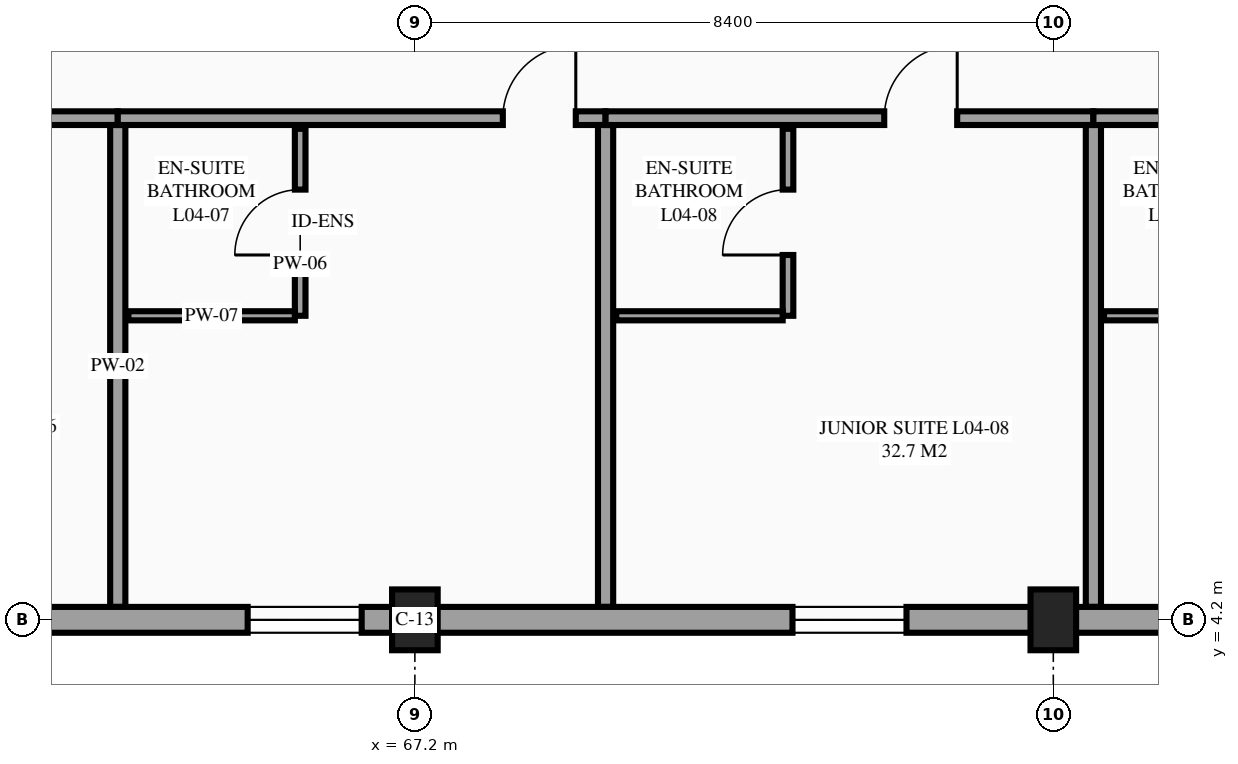
"""IFC4 building model, lengths in metres.
Left out: names, types, materials, properties, quantities, classifications, styles, units other than length and angle.
Written with IfcOpenShell. Run it as: python <this file> out.ifc"""

import sys

from ifc_helpers import new_model, si_unit, direction, frame, frame_2d, origin, origin_2d, place, context, subcontext, project, spatial, rectangle, extrude, element, fill, save


model = new_model("IFC4")
c1 = context("Model", 3, precision=1e-05, world=origin(), true_north=direction((0.0, 1.0)))
c2 = subcontext(c1, "Body", "Model", "MODEL_VIEW")
j1 = project(units=[si_unit("LENGTHUNIT", "METRE"), si_unit("PLANEANGLEUNIT", "RADIAN")], contexts=[c1])
p1 = place(None, origin())
s1 = spatial("IfcSite", under=j1, at=p1, CompositionType="ELEMENT")
p2 = place(p1, origin())
s2 = spatial("IfcBuilding", under=s1, at=p2, CompositionType="ELEMENT")
p3 = place(p2, frame((0.0, 0.0, 18.3)))
s3 = spatial("IfcBuildingStorey", under=s2, at=p3, CompositionType="ELEMENT", Elevation=18.3)
for number, where, z_axis, x_axis in (
    (1, (67.2, 4.2, 0.0), (0.0, 0.0, 1.0), (1.0, 0.0, 0.0)),
    (2, (75.6, 4.2, 0.0), (0.0, 0.0, 1.0), (1.0, 0.0, 0.0)),
):
    element("IfcColumn", number, at=place(p3, frame(where, z_axis=z_axis, x_axis=x_axis)), inside=s3, PredefinedType="COLUMN", context=c2, shape_type="SweptSolid", body=[
        extrude(rectangle(XDim=0.6, YDim=0.8, at=origin_2d()), origin(), (0.0, 0.0, 1.0), 3.6),
    ])
p4 = place(p3, frame((56.873, 10.8, 0.0), z_axis=(0.0, 0.0, 1.0), x_axis=(1.0, 0.0, 0.0)))
e3 = element("IfcWall", 3, at=p4, inside=s3, PredefinedType="PARTITIONING", context=c2, shape_type="SweptSolid", body=[
    extrude(rectangle(XDim=6.418, YDim=0.18, at=frame_2d((3.209, 0.0))), origin(), (0.0, 0.0, 1.0), 3.375),
])
p5 = place(p4, frame((4.366, 0.0, 0.0)))
e4 = element("IfcOpeningElement", 4, at=p5, cuts=e3, PredefinedType="OPENING", context=c2, shape_type="SweptSolid", body=[
    extrude(rectangle(XDim=0.96, YDim=2.15, at=frame_2d((0.48, 1.075))), frame((0.0, 0.1, 0.0), z_axis=(0.0, -1.0, 0.0), x_axis=(1.0, 0.0, 0.0)), (0.0, 0.0, 1.0), 0.2),
])
p6 = place(p3, frame((63.291, 4.37, 0.0), z_axis=(0.0, 0.0, 1.0), x_axis=(0.0, 1.0, 0.0)))
e5 = element("IfcWall", 5, at=p6, inside=s3, PredefinedType="PARTITIONING", context=c2, shape_type="SweptSolid", body=[
    extrude(rectangle(XDim=6.34, YDim=0.2, at=frame_2d((3.17, 0.0))), origin(), (0.0, 0.0, 1.0), 3.375),
])
p7 = place(p3, frame((63.291, 10.8, 0.0), z_axis=(0.0, 0.0, 1.0), x_axis=(1.0, 0.0, 0.0)))
e6 = element("IfcWall", 6, at=p7, inside=s3, PredefinedType="PARTITIONING", context=c2, shape_type="SweptSolid", body=[
    extrude(rectangle(XDim=6.418, YDim=0.18, at=frame_2d((3.209, 0.0))), origin(), (0.0, 0.0, 1.0), 3.375),
])
p8 = place(p7, frame((5.066, 0.0, 0.0)))
e7 = element("IfcOpeningElement", 7, at=p8, cuts=e6, PredefinedType="OPENING", context=c2, shape_type="SweptSolid", body=[
    extrude(rectangle(XDim=0.96, YDim=2.15, at=frame_2d((0.48, 1.075))), frame((0.0, 0.1, 0.0), z_axis=(0.0, -1.0, 0.0), x_axis=(1.0, 0.0, 0.0)), (0.0, 0.0, 1.0), 0.2),
])
p9 = place(p3, frame((69.709, 4.37, 0.0), z_axis=(0.0, 0.0, 1.0), x_axis=(0.0, 1.0, 0.0)))
e8 = element("IfcWall", 8, at=p9, inside=s3, PredefinedType="PARTITIONING", context=c2, shape_type="SweptSolid", body=[
    extrude(rectangle(XDim=6.34, YDim=0.2, at=frame_2d((3.17, 0.0))), origin(), (0.0, 0.0, 1.0), 3.375),
])
p10 = place(p3, frame((65.691, 8.2, 0.0), z_axis=(0.0, 0.0, 1.0), x_axis=(0.0, 1.0, 0.0)))
e9 = element("IfcWall", 9, at=p10, inside=s3, PredefinedType="PARTITIONING", context=c2, shape_type="SweptSolid", body=[
    extrude(rectangle(XDim=2.46, YDim=0.14, at=frame_2d((1.23, 0.0))), origin(), (0.0, 0.0, 1.0), 3.375),
])
p11 = place(p10, frame((0.8, 0.0, 0.0)))
e10 = element("IfcOpeningElement", 10, at=p11, cuts=e9, PredefinedType="OPENING", context=c2, shape_type="SweptSolid", body=[
    extrude(rectangle(XDim=0.86, YDim=2.1, at=frame_2d((0.43, 1.05))), frame((0.0, 0.08, 0.0), z_axis=(0.0, -1.0, 0.0), x_axis=(1.0, 0.0, 0.0)), (0.0, 0.0, 1.0), 0.16),
])
p12 = place(p3, frame((63.431, 8.2, 0.0), z_axis=(0.0, 0.0, 1.0), x_axis=(1.0, 0.0, 0.0)))
e11 = element("IfcWall", 11, at=p12, inside=s3, PredefinedType="PARTITIONING", context=c2, shape_type="SweptSolid", body=[
    extrude(rectangle(XDim=2.19, YDim=0.12, at=frame_2d((1.095, 0.0))), origin(), (0.0, 0.0, 1.0), 3.375),
])
p13 = place(p3, frame((69.709, 10.8, 0.0), z_axis=(0.0, 0.0, 1.0), x_axis=(1.0, 0.0, 0.0)))
e12 = element("IfcWall", 12, at=p13, inside=s3, PredefinedType="PARTITIONING", context=c2, shape_type="SweptSolid", body=[
    extrude(rectangle(XDim=6.418, YDim=0.18, at=frame_2d((3.209, 0.0))), origin(), (0.0, 0.0, 1.0), 3.375),
])
p14 = place(p13, frame((3.666, 0.0, 0.0)))
e13 = element("IfcOpeningElement", 13, at=p14, cuts=e12, PredefinedType="OPENING", context=c2, shape_type="SweptSolid", body=[
    extrude(rectangle(XDim=0.96, YDim=2.15, at=frame_2d((0.48, 1.075))), frame((0.0, 0.1, 0.0), z_axis=(0.0, -1.0, 0.0), x_axis=(1.0, 0.0, 0.0)), (0.0, 0.0, 1.0), 0.2),
])
p15 = place(p3, frame((76.127, 4.37, 0.0), z_axis=(0.0, 0.0, 1.0), x_axis=(0.0, 1.0, 0.0)))
e14 = element("IfcWall", 14, at=p15, inside=s3, PredefinedType="PARTITIONING", context=c2, shape_type="SweptSolid", body=[
    extrude(rectangle(XDim=6.34, YDim=0.2, at=frame_2d((3.17, 0.0))), origin(), (0.0, 0.0, 1.0), 3.375),
])
p16 = place(p3, frame((72.109, 8.2, 0.0), z_axis=(0.0, 0.0, 1.0), x_axis=(0.0, 1.0, 0.0)))
e15 = element("IfcWall", 15, at=p16, inside=s3, PredefinedType="PARTITIONING", context=c2, shape_type="SweptSolid", body=[
    extrude(rectangle(XDim=2.46, YDim=0.14, at=frame_2d((1.23, 0.0))), origin(), (0.0, 0.0, 1.0), 3.375),
])
p17 = place(p16, frame((0.8, 0.0, 0.0)))
e16 = element("IfcOpeningElement", 16, at=p17, cuts=e15, PredefinedType="OPENING", context=c2, shape_type="SweptSolid", body=[
    extrude(rectangle(XDim=0.86, YDim=2.1, at=frame_2d((0.43, 1.05))), frame((0.0, 0.08, 0.0), z_axis=(0.0, -1.0, 0.0), x_axis=(1.0, 0.0, 0.0)), (0.0, 0.0, 1.0), 0.16),
])
p18 = place(p3, frame((69.849, 8.2, 0.0), z_axis=(0.0, 0.0, 1.0), x_axis=(1.0, 0.0, 0.0)))
e17 = element("IfcWall", 17, at=p18, inside=s3, PredefinedType="PARTITIONING", context=c2, shape_type="SweptSolid", body=[
    extrude(rectangle(XDim=2.19, YDim=0.12, at=frame_2d((1.095, 0.0))), origin(), (0.0, 0.0, 1.0), 3.375),
])
p19 = place(p3, frame((76.127, 10.8, 0.0), z_axis=(0.0, 0.0, 1.0), x_axis=(1.0, 0.0, 0.0)))
e18 = element("IfcWall", 18, at=p19, inside=s3, PredefinedType="PARTITIONING", context=c2, shape_type="SweptSolid", body=[
    extrude(rectangle(XDim=6.418, YDim=0.18, at=frame_2d((3.209, 0.0))), origin(), (0.0, 0.0, 1.0), 3.375),
])
p20 = place(p19, frame((4.366, 0.0, 0.0)))
e19 = element("IfcOpeningElement", 19, at=p20, cuts=e18, PredefinedType="OPENING", context=c2, shape_type="SweptSolid", body=[
    extrude(rectangle(XDim=0.96, YDim=2.15, at=frame_2d((0.48, 1.075))), frame((0.0, 0.1, 0.0), z_axis=(0.0, -1.0, 0.0), x_axis=(1.0, 0.0, 0.0)), (0.0, 0.0, 1.0), 0.2),
])
p21 = place(p3, frame((76.267, 8.2, 0.0), z_axis=(0.0, 0.0, 1.0), x_axis=(1.0, 0.0, 0.0)))
e20 = element("IfcWall", 20, at=p21, inside=s3, PredefinedType="PARTITIONING", context=c2, shape_type="SweptSolid", body=[
    extrude(rectangle(XDim=2.19, YDim=0.12, at=frame_2d((1.095, 0.0))), origin(), (0.0, 0.0, 1.0), 3.375),
])
p22 = place(p3, frame((58.8, 4.2, 0.0), z_axis=(0.0, 0.0, 1.0), x_axis=(1.0, 0.0, 0.0)))
e21 = element("IfcWall", 21, at=p22, inside=s3, PredefinedType="STANDARD", context=c2, shape_type="SweptSolid", body=[
    extrude(rectangle(XDim=8.4, YDim=0.34, at=frame_2d((4.2, 0.0))), origin(), (0.0, 0.0, 1.0), 2.78),
])
p23 = place(p22, frame((0.782, 0.0, 0.85)))
e22 = element("IfcOpeningElement", 22, at=p23, cuts=e21, PredefinedType="OPENING", context=c2, shape_type="SweptSolid", body=[
    extrude(rectangle(XDim=1.5, YDim=1.5, at=frame_2d((0.75, 0.75))), frame((0.0, 0.18, 0.0), z_axis=(0.0, -1.0, 0.0), x_axis=(1.0, 0.0, 0.0)), (0.0, 0.0, 1.0), 0.36),
])
p24 = place(p22, frame((6.2, 0.0, 0.85)))
e23 = element("IfcOpeningElement", 23, at=p24, cuts=e21, PredefinedType="OPENING", context=c2, shape_type="SweptSolid", body=[
    extrude(rectangle(XDim=1.5, YDim=1.5, at=frame_2d((0.75, 0.75))), frame((0.0, 0.18, 0.0), z_axis=(0.0, -1.0, 0.0), x_axis=(1.0, 0.0, 0.0)), (0.0, 0.0, 1.0), 0.36),
])
p25 = place(p3, frame((67.2, 4.2, 0.0), z_axis=(0.0, 0.0, 1.0), x_axis=(1.0, 0.0, 0.0)))
e24 = element("IfcWall", 24, at=p25, inside=s3, PredefinedType="STANDARD", context=c2, shape_type="SweptSolid", body=[
    extrude(rectangle(XDim=8.4, YDim=0.34, at=frame_2d((4.2, 0.0))), origin(), (0.0, 0.0, 1.0), 2.88),
])
p26 = place(p25, frame((4.968, 0.0, 0.85)))
e25 = element("IfcOpeningElement", 25, at=p26, cuts=e24, PredefinedType="OPENING", context=c2, shape_type="SweptSolid", body=[
    extrude(rectangle(XDim=1.5, YDim=1.5, at=frame_2d((0.75, 0.75))), frame((0.0, 0.18, 0.0), z_axis=(0.0, -1.0, 0.0), x_axis=(1.0, 0.0, 0.0)), (0.0, 0.0, 1.0), 0.36),
])
p27 = place(p3, frame((75.6, 4.2, 0.0), z_axis=(0.0, 0.0, 1.0), x_axis=(1.0, 0.0, 0.0)))
e26 = element("IfcWall", 26, at=p27, inside=s3, PredefinedType="STANDARD", context=c2, shape_type="SweptSolid", body=[
    extrude(rectangle(XDim=16.8, YDim=0.34, at=frame_2d((8.4, 0.0))), origin(), (0.0, 0.0, 1.0), 2.48),
])
p28 = place(p27, frame((2.986, 0.0, 0.85)))
e27 = element("IfcOpeningElement", 27, at=p28, cuts=e26, PredefinedType="OPENING", context=c2, shape_type="SweptSolid", body=[
    extrude(rectangle(XDim=1.5, YDim=1.5, at=frame_2d((0.75, 0.75))), frame((0.0, 0.18, 0.0), z_axis=(0.0, -1.0, 0.0), x_axis=(1.0, 0.0, 0.0)), (0.0, 0.0, 1.0), 0.36),
])
p29 = place(p27, frame((9.405, 0.0, 0.85)))
e28 = element("IfcOpeningElement", 28, at=p29, cuts=e26, PredefinedType="OPENING", context=c2, shape_type="SweptSolid", body=[
    extrude(rectangle(XDim=1.5, YDim=1.5, at=frame_2d((0.75, 0.75))), frame((0.0, 0.18, 0.0), z_axis=(0.0, -1.0, 0.0), x_axis=(1.0, 0.0, 0.0)), (0.0, 0.0, 1.0), 0.36),
])
p30 = place(p27, frame((14.573, 0.0, 0.85)))
e29 = element("IfcOpeningElement", 29, at=p30, cuts=e26, PredefinedType="OPENING", context=c2, shape_type="SweptSolid", body=[
    extrude(rectangle(XDim=1.5, YDim=1.5, at=frame_2d((0.75, 0.75))), frame((0.0, 0.18, 0.0), z_axis=(0.0, -1.0, 0.0), x_axis=(1.0, 0.0, 0.0)), (0.0, 0.0, 1.0), 0.36),
])
p31 = place(p24, origin())
e30 = element("IfcWindow", 30, at=p31, inside=s3, PartitioningType="SINGLE_PANEL", PredefinedType="WINDOW", context=c2, shape_type="SweptSolid", body=[
    extrude(rectangle(XDim=1.5, YDim=1.5, at=frame_2d((0.75, 0.75))), frame((0.0, 0.03, 0.0), z_axis=(0.0, -1.0, 0.0), x_axis=(1.0, 0.0, 0.0)), (0.0, 0.0, 1.0), 0.06),
])
fill(e23, e30)
p32 = place(p26, origin())
e31 = element("IfcWindow", 31, at=p32, inside=s3, PartitioningType="SINGLE_PANEL", PredefinedType="WINDOW", context=c2, shape_type="SweptSolid", body=[
    extrude(rectangle(XDim=1.5, YDim=1.5, at=frame_2d((0.75, 0.75))), frame((0.0, 0.03, 0.0), z_axis=(0.0, -1.0, 0.0), x_axis=(1.0, 0.0, 0.0)), (0.0, 0.0, 1.0), 0.06),
])
fill(e25, e31)
p33 = place(p8, origin())
e32 = element("IfcDoor", 32, at=p33, inside=s3, OperationType="SINGLE_SWING_RIGHT", PredefinedType="DOOR", context=c2, shape_type="SweptSolid", body=[
    extrude(rectangle(XDim=0.96, YDim=2.15, at=frame_2d((0.48, 1.075))), frame((0.0, 0.025, 0.0), z_axis=(0.0, -1.0, 0.0), x_axis=(1.0, 0.0, 0.0)), (0.0, 0.0, 1.0), 0.05),
])
fill(e7, e32)
p34 = place(p11, origin())
e33 = element("IfcDoor", 33, at=p34, inside=s3, OperationType="SINGLE_SWING_LEFT", PredefinedType="DOOR", context=c2, shape_type="SweptSolid", body=[
    extrude(rectangle(XDim=0.86, YDim=2.1, at=frame_2d((0.43, 1.05))), frame((0.0, 0.025, 0.0), z_axis=(0.0, -1.0, 0.0), x_axis=(1.0, 0.0, 0.0)), (0.0, 0.0, 1.0), 0.05),
])
fill(e10, e33)
p35 = place(p14, origin())
e34 = element("IfcDoor", 34, at=p35, inside=s3, OperationType="SINGLE_SWING_RIGHT", PredefinedType="DOOR", context=c2, shape_type="SweptSolid", body=[
    extrude(rectangle(XDim=0.96, YDim=2.15, at=frame_2d((0.48, 1.075))), frame((0.0, 0.025, 0.0), z_axis=(0.0, -1.0, 0.0), x_axis=(1.0, 0.0, 0.0)), (0.0, 0.0, 1.0), 0.05),
])
fill(e13, e34)
p36 = place(p17, origin())
e35 = element("IfcDoor", 35, at=p36, inside=s3, OperationType="SINGLE_SWING_LEFT", PredefinedType="DOOR", context=c2, shape_type="SweptSolid", body=[
    extrude(rectangle(XDim=0.86, YDim=2.1, at=frame_2d((0.43, 1.05))), frame((0.0, 0.025, 0.0), z_axis=(0.0, -1.0, 0.0), x_axis=(1.0, 0.0, 0.0)), (0.0, 0.0, 1.0), 0.05),
])
fill(e16, e35)
save(model, sys.argv[1])
